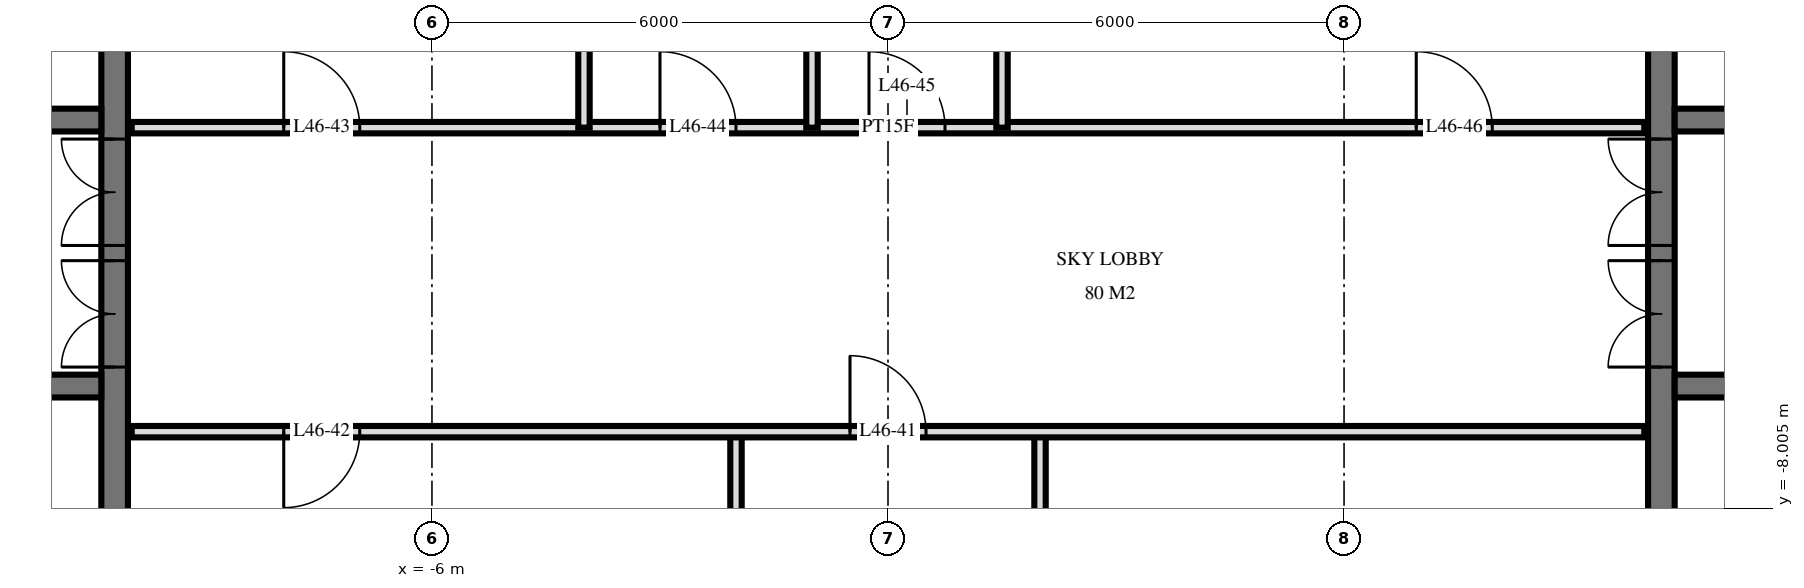
"""IFC4 building model, lengths in metres.
Left out: names, types, materials, properties, quantities, classifications, styles, units other than length and angle.
Written with IfcOpenShell. Run it as: python <this file> out.ifc"""

import sys

from ifc_helpers import new_model, si_unit, direction, frame, frame_2d, origin, place, context, subcontext, project, spatial, rectangle, extrude, element, fill, save


model = new_model("IFC4")
c1 = context("Model", 3, precision=1e-05, world=origin(), true_north=direction((0.0, 1.0)))
c2 = subcontext(c1, "Body", "Model", "MODEL_VIEW")
j1 = project(units=[si_unit("LENGTHUNIT", "METRE"), si_unit("PLANEANGLEUNIT", "RADIAN")], contexts=[c1])
p1 = place(None, origin())
s1 = spatial("IfcSite", under=j1, at=p1, CompositionType="ELEMENT")
p2 = place(p1, origin())
s2 = spatial("IfcBuilding", under=s1, at=p2, CompositionType="ELEMENT")
p3 = place(p2, frame((0.0, 0.0, 177.6)))
s3 = spatial("IfcBuildingStorey", under=s2, at=p3, CompositionType="ELEMENT", Elevation=177.6)
p4 = place(p3, frame((-10.175, -14.55, 0.0), z_axis=(0.0, 0.0, 1.0), x_axis=(0.0, 1.0, 0.0)))
e1 = element("IfcWall", 1, at=p4, inside=s3, PredefinedType="SHEAR", context=c2, shape_type="SweptSolid", body=[
    extrude(rectangle(XDim=14.1, YDim=0.35, at=frame_2d((7.05, 0.0))), origin(), (0.0, 0.0, 1.0), 6.0),
])
p5 = place(p4, frame((8.4, 0.0, 0.0)))
e2 = element("IfcOpeningElement", 2, at=p5, cuts=e1, PredefinedType="OPENING", context=c2, shape_type="SweptSolid", body=[
    extrude(rectangle(XDim=1.4, YDim=2.4, at=frame_2d((0.7, 1.2))), frame((0.0, 0.185, 0.0), z_axis=(0.0, -1.0, 0.0), x_axis=(1.0, 0.0, 0.0)), (0.0, 0.0, 1.0), 0.37),
])
p6 = place(p4, frame((10.0, 0.0, 0.0)))
e3 = element("IfcOpeningElement", 3, at=p6, cuts=e1, PredefinedType="OPENING", context=c2, shape_type="SweptSolid", body=[
    extrude(rectangle(XDim=1.4, YDim=2.4, at=frame_2d((0.7, 1.2))), frame((0.0, 0.185, 0.0), z_axis=(0.0, -1.0, 0.0), x_axis=(1.0, 0.0, 0.0)), (0.0, 0.0, 1.0), 0.37),
])
p7 = place(p4, frame((4.0, 0.0, 0.0)))
e4 = element("IfcOpeningElement", 4, at=p7, cuts=e1, PredefinedType="OPENING", context=c2, shape_type="SweptSolid", body=[
    extrude(rectangle(XDim=1.2, YDim=2.1, at=frame_2d((0.6, 1.05))), frame((0.0, 0.185, 0.0), z_axis=(0.0, -1.0, 0.0), x_axis=(1.0, 0.0, 0.0)), (0.0, 0.0, 1.0), 0.37),
])
p8 = place(p3, frame((-24.05, -2.9, 0.0), z_axis=(0.0, 0.0, 1.0), x_axis=(1.0, 0.0, 0.0)))
e5 = element("IfcWall", 5, at=p8, inside=s3, PredefinedType="SHEAR", context=c2, shape_type="SweptSolid", body=[
    extrude(rectangle(XDim=13.7, YDim=0.3, at=frame_2d((6.85, 0.0))), origin(), (0.0, 0.0, 1.0), 6.0),
])
p9 = place(p8, frame((0.55, 0.0, 0.0)))
e6 = element("IfcOpeningElement", 6, at=p9, cuts=e5, PredefinedType="OPENING", context=c2, shape_type="SweptSolid", body=[
    extrude(rectangle(XDim=1.1, YDim=2.1, at=frame_2d((0.55, 1.05))), frame((0.0, 0.16, 0.0), z_axis=(0.0, -1.0, 0.0), x_axis=(1.0, 0.0, 0.0)), (0.0, 0.0, 1.0), 0.32),
])
p10 = place(p8, frame((5.9, 0.0, 0.0)))
e7 = element("IfcOpeningElement", 7, at=p10, cuts=e5, PredefinedType="OPENING", context=c2, shape_type="SweptSolid", body=[
    extrude(rectangle(XDim=0.9, YDim=2.1, at=frame_2d((0.45, 1.05))), frame((0.0, 0.16, 0.0), z_axis=(0.0, -1.0, 0.0), x_axis=(1.0, 0.0, 0.0)), (0.0, 0.0, 1.0), 0.32),
])
p11 = place(p8, frame((11.85, 0.0, 0.0)))
e8 = element("IfcOpeningElement", 8, at=p11, cuts=e5, PredefinedType="OPENING", context=c2, shape_type="SweptSolid", body=[
    extrude(rectangle(XDim=1.0, YDim=2.1, at=frame_2d((0.5, 1.05))), frame((0.0, 0.16, 0.0), z_axis=(0.0, -1.0, 0.0), x_axis=(1.0, 0.0, 0.0)), (0.0, 0.0, 1.0), 0.32),
])
p12 = place(p8, frame((9.312, 0.0, 0.0)))
e9 = element("IfcOpeningElement", 9, at=p12, cuts=e5, PredefinedType="OPENING", context=c2, shape_type="SweptSolid", body=[
    extrude(rectangle(XDim=1.0, YDim=2.1, at=frame_2d((0.5, 1.05))), frame((0.0, 0.16, 0.0), z_axis=(0.0, -1.0, 0.0), x_axis=(1.0, 0.0, 0.0)), (0.0, 0.0, 1.0), 0.32),
])
p13 = place(p8, frame((7.887, 0.0, 0.0)))
e10 = element("IfcOpeningElement", 10, at=p13, cuts=e5, PredefinedType="OPENING", context=c2, shape_type="SweptSolid", body=[
    extrude(rectangle(XDim=1.0, YDim=2.1, at=frame_2d((0.5, 1.05))), frame((0.0, 0.16, 0.0), z_axis=(0.0, -1.0, 0.0), x_axis=(1.0, 0.0, 0.0)), (0.0, 0.0, 1.0), 0.32),
])
p14 = place(p8, frame((3.0, 0.0, 0.0)))
e11 = element("IfcOpeningElement", 11, at=p14, cuts=e5, PredefinedType="OPENING", context=c2, shape_type="SweptSolid", body=[
    extrude(rectangle(XDim=1.0, YDim=2.1, at=frame_2d((0.5, 1.05))), frame((0.0, 0.16, 0.0), z_axis=(0.0, -1.0, 0.0), x_axis=(1.0, 0.0, 0.0)), (0.0, 0.0, 1.0), 0.32),
])
p15 = place(p3, frame((-24.05, -6.4, 0.0), z_axis=(0.0, 0.0, 1.0), x_axis=(1.0, 0.0, 0.0)))
e12 = element("IfcWall", 12, at=p15, inside=s3, PredefinedType="SHEAR", context=c2, shape_type="SweptSolid", body=[
    extrude(rectangle(XDim=13.7, YDim=0.3, at=frame_2d((6.85, 0.0))), origin(), (0.0, 0.0, 1.0), 6.0),
])
p16 = place(p15, frame((2.95, 0.0, 0.0)))
e13 = element("IfcOpeningElement", 13, at=p16, cuts=e12, PredefinedType="OPENING", context=c2, shape_type="SweptSolid", body=[
    extrude(rectangle(XDim=1.1, YDim=2.1, at=frame_2d((0.55, 1.05))), frame((0.0, 0.16, 0.0), z_axis=(0.0, -1.0, 0.0), x_axis=(1.0, 0.0, 0.0)), (0.0, 0.0, 1.0), 0.32),
])
p17 = place(p15, frame((0.55, 0.0, 0.0)))
e14 = element("IfcOpeningElement", 14, at=p17, cuts=e12, PredefinedType="OPENING", context=c2, shape_type="SweptSolid", body=[
    extrude(rectangle(XDim=1.1, YDim=2.1, at=frame_2d((0.55, 1.05))), frame((0.0, 0.16, 0.0), z_axis=(0.0, -1.0, 0.0), x_axis=(1.0, 0.0, 0.0)), (0.0, 0.0, 1.0), 0.32),
])
p18 = place(p15, frame((5.8, 0.0, 0.0)))
e15 = element("IfcOpeningElement", 15, at=p18, cuts=e12, PredefinedType="OPENING", context=c2, shape_type="SweptSolid", body=[
    extrude(rectangle(XDim=1.1, YDim=2.1, at=frame_2d((0.55, 1.05))), frame((0.0, 0.16, 0.0), z_axis=(0.0, -1.0, 0.0), x_axis=(1.0, 0.0, 0.0)), (0.0, 0.0, 1.0), 0.32),
])
p19 = place(p3, frame((10.175, -14.55, 0.0), z_axis=(0.0, 0.0, 1.0), x_axis=(0.0, 1.0, 0.0)))
e16 = element("IfcWall", 16, at=p19, inside=s3, PredefinedType="SHEAR", context=c2, shape_type="SweptSolid", body=[
    extrude(rectangle(XDim=14.1, YDim=0.35, at=frame_2d((7.05, 0.0))), origin(), (0.0, 0.0, 1.0), 6.0),
])
p20 = place(p19, frame((8.4, 0.0, 0.0)))
e17 = element("IfcOpeningElement", 17, at=p20, cuts=e16, PredefinedType="OPENING", context=c2, shape_type="SweptSolid", body=[
    extrude(rectangle(XDim=1.4, YDim=2.4, at=frame_2d((0.7, 1.2))), frame((0.0, 0.185, 0.0), z_axis=(0.0, -1.0, 0.0), x_axis=(1.0, 0.0, 0.0)), (0.0, 0.0, 1.0), 0.37),
])
p21 = place(p19, frame((10.0, 0.0, 0.0)))
e18 = element("IfcOpeningElement", 18, at=p21, cuts=e16, PredefinedType="OPENING", context=c2, shape_type="SweptSolid", body=[
    extrude(rectangle(XDim=1.4, YDim=2.4, at=frame_2d((0.7, 1.2))), frame((0.0, 0.185, 0.0), z_axis=(0.0, -1.0, 0.0), x_axis=(1.0, 0.0, 0.0)), (0.0, 0.0, 1.0), 0.37),
])
p22 = place(p19, frame((4.0, 0.0, 0.0)))
e19 = element("IfcOpeningElement", 19, at=p22, cuts=e16, PredefinedType="OPENING", context=c2, shape_type="SweptSolid", body=[
    extrude(rectangle(XDim=1.2, YDim=2.1, at=frame_2d((0.6, 1.05))), frame((0.0, 0.185, 0.0), z_axis=(0.0, -1.0, 0.0), x_axis=(1.0, 0.0, 0.0)), (0.0, 0.0, 1.0), 0.37),
])
p23 = place(p3, frame((10.35, -2.9, 0.0), z_axis=(0.0, 0.0, 1.0), x_axis=(1.0, 0.0, 0.0)))
e20 = element("IfcWall", 20, at=p23, inside=s3, PredefinedType="SHEAR", context=c2, shape_type="SweptSolid", body=[
    extrude(rectangle(XDim=13.7, YDim=0.3, at=frame_2d((6.85, 0.0))), origin(), (0.0, 0.0, 1.0), 6.0),
])
p24 = place(p23, frame((12.05, 0.0, 0.0)))
e21 = element("IfcOpeningElement", 21, at=p24, cuts=e20, PredefinedType="OPENING", context=c2, shape_type="SweptSolid", body=[
    extrude(rectangle(XDim=1.1, YDim=2.1, at=frame_2d((0.55, 1.05))), frame((0.0, 0.16, 0.0), z_axis=(0.0, -1.0, 0.0), x_axis=(1.0, 0.0, 0.0)), (0.0, 0.0, 1.0), 0.32),
])
p25 = place(p23, frame((6.9, 0.0, 0.0)))
e22 = element("IfcOpeningElement", 22, at=p25, cuts=e20, PredefinedType="OPENING", context=c2, shape_type="SweptSolid", body=[
    extrude(rectangle(XDim=0.9, YDim=2.1, at=frame_2d((0.45, 1.05))), frame((0.0, 0.16, 0.0), z_axis=(0.0, -1.0, 0.0), x_axis=(1.0, 0.0, 0.0)), (0.0, 0.0, 1.0), 0.32),
])
p26 = place(p23, frame((0.85, 0.0, 0.0)))
e23 = element("IfcOpeningElement", 23, at=p26, cuts=e20, PredefinedType="OPENING", context=c2, shape_type="SweptSolid", body=[
    extrude(rectangle(XDim=1.0, YDim=2.1, at=frame_2d((0.5, 1.05))), frame((0.0, 0.16, 0.0), z_axis=(0.0, -1.0, 0.0), x_axis=(1.0, 0.0, 0.0)), (0.0, 0.0, 1.0), 0.32),
])
p27 = place(p23, frame((3.387, 0.0, 0.0)))
e24 = element("IfcOpeningElement", 24, at=p27, cuts=e20, PredefinedType="OPENING", context=c2, shape_type="SweptSolid", body=[
    extrude(rectangle(XDim=1.0, YDim=2.1, at=frame_2d((0.5, 1.05))), frame((0.0, 0.16, 0.0), z_axis=(0.0, -1.0, 0.0), x_axis=(1.0, 0.0, 0.0)), (0.0, 0.0, 1.0), 0.32),
])
p28 = place(p23, frame((4.812, 0.0, 0.0)))
e25 = element("IfcOpeningElement", 25, at=p28, cuts=e20, PredefinedType="OPENING", context=c2, shape_type="SweptSolid", body=[
    extrude(rectangle(XDim=1.0, YDim=2.1, at=frame_2d((0.5, 1.05))), frame((0.0, 0.16, 0.0), z_axis=(0.0, -1.0, 0.0), x_axis=(1.0, 0.0, 0.0)), (0.0, 0.0, 1.0), 0.32),
])
p29 = place(p23, frame((9.7, 0.0, 0.0)))
e26 = element("IfcOpeningElement", 26, at=p29, cuts=e20, PredefinedType="OPENING", context=c2, shape_type="SweptSolid", body=[
    extrude(rectangle(XDim=1.0, YDim=2.1, at=frame_2d((0.5, 1.05))), frame((0.0, 0.16, 0.0), z_axis=(0.0, -1.0, 0.0), x_axis=(1.0, 0.0, 0.0)), (0.0, 0.0, 1.0), 0.32),
])
p30 = place(p3, frame((10.35, -6.4, 0.0), z_axis=(0.0, 0.0, 1.0), x_axis=(1.0, 0.0, 0.0)))
e27 = element("IfcWall", 27, at=p30, inside=s3, PredefinedType="SHEAR", context=c2, shape_type="SweptSolid", body=[
    extrude(rectangle(XDim=13.7, YDim=0.3, at=frame_2d((6.85, 0.0))), origin(), (0.0, 0.0, 1.0), 6.0),
])
p31 = place(p30, frame((9.65, 0.0, 0.0)))
e28 = element("IfcOpeningElement", 28, at=p31, cuts=e27, PredefinedType="OPENING", context=c2, shape_type="SweptSolid", body=[
    extrude(rectangle(XDim=1.1, YDim=2.1, at=frame_2d((0.55, 1.05))), frame((0.0, 0.16, 0.0), z_axis=(0.0, -1.0, 0.0), x_axis=(1.0, 0.0, 0.0)), (0.0, 0.0, 1.0), 0.32),
])
p32 = place(p30, frame((12.05, 0.0, 0.0)))
e29 = element("IfcOpeningElement", 29, at=p32, cuts=e27, PredefinedType="OPENING", context=c2, shape_type="SweptSolid", body=[
    extrude(rectangle(XDim=1.1, YDim=2.1, at=frame_2d((0.55, 1.05))), frame((0.0, 0.16, 0.0), z_axis=(0.0, -1.0, 0.0), x_axis=(1.0, 0.0, 0.0)), (0.0, 0.0, 1.0), 0.32),
])
p33 = place(p30, frame((6.8, 0.0, 0.0)))
e30 = element("IfcOpeningElement", 30, at=p33, cuts=e27, PredefinedType="OPENING", context=c2, shape_type="SweptSolid", body=[
    extrude(rectangle(XDim=1.1, YDim=2.1, at=frame_2d((0.55, 1.05))), frame((0.0, 0.16, 0.0), z_axis=(0.0, -1.0, 0.0), x_axis=(1.0, 0.0, 0.0)), (0.0, 0.0, 1.0), 0.32),
])
p34 = place(p3, frame((2.0, -11.0, 0.0), z_axis=(0.0, 0.0, 1.0), x_axis=(0.0, 1.0, 0.0)))
e31 = element("IfcWall", 31, at=p34, inside=s3, PredefinedType="PARTITIONING", context=c2, shape_type="SweptSolid", body=[
    extrude(rectangle(XDim=4.0, YDim=0.15, at=frame_2d((2.0, 0.0))), origin(), (0.0, 0.0, 1.0), 5.7),
])
for number, where, z_axis, x_axis in (
    (32, (1.5, -3.0, 0.0), (0.0, 0.0, 1.0), (0.0, 1.0, 0.0)),
    (33, (-1.0, -3.0, 0.0), (0.0, 0.0, 1.0), (0.0, 1.0, 0.0)),
):
    element("IfcWall", number, at=place(p3, frame(where, z_axis=z_axis, x_axis=x_axis)), inside=s3, PredefinedType="PLUMBINGWALL", context=c2, shape_type="SweptSolid", body=[
        extrude(rectangle(XDim=3.96, YDim=0.15, at=frame_2d((1.98, 0.0))), origin(), (0.0, 0.0, 1.0), 5.7),
    ])
p35 = place(p3, frame((-2.0, -11.0, 0.0), z_axis=(0.0, 0.0, 1.0), x_axis=(0.0, 1.0, 0.0)))
e34 = element("IfcWall", 34, at=p35, inside=s3, PredefinedType="PARTITIONING", context=c2, shape_type="SweptSolid", body=[
    extrude(rectangle(XDim=4.0, YDim=0.15, at=frame_2d((2.0, 0.0))), origin(), (0.0, 0.0, 1.0), 5.7),
])
p36 = place(p3, frame((-4.0, -3.0, 0.0), z_axis=(0.0, 0.0, 1.0), x_axis=(0.0, 1.0, 0.0)))
e35 = element("IfcWall", 35, at=p36, inside=s3, PredefinedType="PLUMBINGWALL", context=c2, shape_type="SweptSolid", body=[
    extrude(rectangle(XDim=3.96, YDim=0.15, at=frame_2d((1.98, 0.0))), origin(), (0.0, 0.0, 1.0), 5.7),
])
p37 = place(p3, frame((-9.95, -7.0, 0.0), z_axis=(0.0, 0.0, 1.0), x_axis=(1.0, 0.0, 0.0)))
e36 = element("IfcWall", 36, at=p37, inside=s3, PredefinedType="PARTITIONING", context=c2, shape_type="SweptSolid", body=[
    extrude(rectangle(XDim=19.9, YDim=0.15, at=frame_2d((9.95, 0.0))), origin(), (0.0, 0.0, 1.0), 5.7),
])
p38 = place(p37, frame((9.45, 0.0, 0.0)))
e37 = element("IfcOpeningElement", 37, at=p38, cuts=e36, PredefinedType="OPENING", context=c2, shape_type="SweptSolid", body=[
    extrude(rectangle(XDim=1.0, YDim=2.1, at=frame_2d((0.5, 1.05))), frame((0.0, 0.085, 0.0), z_axis=(0.0, -1.0, 0.0), x_axis=(1.0, 0.0, 0.0)), (0.0, 0.0, 1.0), 0.17),
])
p39 = place(p37, frame((2.0, 0.0, 0.0)))
e38 = element("IfcOpeningElement", 38, at=p39, cuts=e36, PredefinedType="OPENING", context=c2, shape_type="SweptSolid", body=[
    extrude(rectangle(XDim=1.0, YDim=2.1, at=frame_2d((0.5, 1.05))), frame((0.0, 0.085, 0.0), z_axis=(0.0, -1.0, 0.0), x_axis=(1.0, 0.0, 0.0)), (0.0, 0.0, 1.0), 0.17),
])
p40 = place(p3, frame((-9.95, -3.0, 0.0), z_axis=(0.0, 0.0, 1.0), x_axis=(1.0, 0.0, 0.0)))
e39 = element("IfcWall", 39, at=p40, inside=s3, PredefinedType="PARTITIONING", context=c2, shape_type="SweptSolid", body=[
    extrude(rectangle(XDim=19.9, YDim=0.15, at=frame_2d((9.95, 0.0))), origin(), (0.0, 0.0, 1.0), 5.7),
])
p41 = place(p40, frame((2.0, 0.0, 0.0)))
e40 = element("IfcOpeningElement", 40, at=p41, cuts=e39, PredefinedType="OPENING", context=c2, shape_type="SweptSolid", body=[
    extrude(rectangle(XDim=1.0, YDim=2.1, at=frame_2d((0.5, 1.05))), frame((0.0, 0.085, 0.0), z_axis=(0.0, -1.0, 0.0), x_axis=(1.0, 0.0, 0.0)), (0.0, 0.0, 1.0), 0.17),
])
p42 = place(p40, frame((6.95, 0.0, 0.0)))
e41 = element("IfcOpeningElement", 41, at=p42, cuts=e39, PredefinedType="OPENING", context=c2, shape_type="SweptSolid", body=[
    extrude(rectangle(XDim=1.0, YDim=2.1, at=frame_2d((0.5, 1.05))), frame((0.0, 0.085, 0.0), z_axis=(0.0, -1.0, 0.0), x_axis=(1.0, 0.0, 0.0)), (0.0, 0.0, 1.0), 0.17),
])
p43 = place(p40, frame((9.7, 0.0, 0.0)))
e42 = element("IfcOpeningElement", 42, at=p43, cuts=e39, PredefinedType="OPENING", context=c2, shape_type="SweptSolid", body=[
    extrude(rectangle(XDim=1.0, YDim=2.1, at=frame_2d((0.5, 1.05))), frame((0.0, 0.085, 0.0), z_axis=(0.0, -1.0, 0.0), x_axis=(1.0, 0.0, 0.0)), (0.0, 0.0, 1.0), 0.17),
])
p44 = place(p40, frame((16.9, 0.0, 0.0)))
e43 = element("IfcOpeningElement", 43, at=p44, cuts=e39, PredefinedType="OPENING", context=c2, shape_type="SweptSolid", body=[
    extrude(rectangle(XDim=1.0, YDim=2.1, at=frame_2d((0.5, 1.05))), frame((0.0, 0.085, 0.0), z_axis=(0.0, -1.0, 0.0), x_axis=(1.0, 0.0, 0.0)), (0.0, 0.0, 1.0), 0.17),
])
p45 = place(p5, origin())
e44 = element("IfcDoor", 44, at=p45, inside=s3, OperationType="DOUBLE_DOOR_SINGLE_SWING", PredefinedType="DOOR", context=c2, shape_type="SweptSolid", body=[
    extrude(rectangle(XDim=1.4, YDim=2.4, at=frame_2d((0.7, 1.2))), frame((0.0, 0.025, 0.0), z_axis=(0.0, -1.0, 0.0), x_axis=(1.0, 0.0, 0.0)), (0.0, 0.0, 1.0), 0.05),
])
fill(e2, e44)
p46 = place(p6, origin())
e45 = element("IfcDoor", 45, at=p46, inside=s3, OperationType="DOUBLE_DOOR_SINGLE_SWING", PredefinedType="DOOR", context=c2, shape_type="SweptSolid", body=[
    extrude(rectangle(XDim=1.4, YDim=2.4, at=frame_2d((0.7, 1.2))), frame((0.0, 0.025, 0.0), z_axis=(0.0, -1.0, 0.0), x_axis=(1.0, 0.0, 0.0)), (0.0, 0.0, 1.0), 0.05),
])
fill(e3, e45)
p47 = place(p20, origin())
e46 = element("IfcDoor", 46, at=p47, inside=s3, OperationType="DOUBLE_DOOR_SINGLE_SWING", PredefinedType="DOOR", context=c2, shape_type="SweptSolid", body=[
    extrude(rectangle(XDim=1.4, YDim=2.4, at=frame_2d((0.7, 1.2))), frame((0.0, 0.025, 0.0), z_axis=(0.0, -1.0, 0.0), x_axis=(1.0, 0.0, 0.0)), (0.0, 0.0, 1.0), 0.05),
])
fill(e17, e46)
p48 = place(p21, origin())
e47 = element("IfcDoor", 47, at=p48, inside=s3, OperationType="DOUBLE_DOOR_SINGLE_SWING", PredefinedType="DOOR", context=c2, shape_type="SweptSolid", body=[
    extrude(rectangle(XDim=1.4, YDim=2.4, at=frame_2d((0.7, 1.2))), frame((0.0, 0.025, 0.0), z_axis=(0.0, -1.0, 0.0), x_axis=(1.0, 0.0, 0.0)), (0.0, 0.0, 1.0), 0.05),
])
fill(e18, e47)
p49 = place(p38, origin())
e48 = element("IfcDoor", 48, at=p49, inside=s3, OperationType="SINGLE_SWING_RIGHT", PredefinedType="DOOR", context=c2, shape_type="SweptSolid", body=[
    extrude(rectangle(XDim=1.0, YDim=2.1, at=frame_2d((0.5, 1.05))), frame((0.0, 0.025, 0.0), z_axis=(0.0, -1.0, 0.0), x_axis=(1.0, 0.0, 0.0)), (0.0, 0.0, 1.0), 0.05),
])
fill(e37, e48)
p50 = place(p39, frame((0.5, 0.0, 0.0), z_axis=(0.0, 0.0, 1.0), x_axis=(-1.0, 0.0, 0.0)))
e49 = element("IfcDoor", 49, at=p50, inside=s3, OperationType="SINGLE_SWING_LEFT", PredefinedType="DOOR", context=c2, shape_type="SweptSolid", body=[
    extrude(rectangle(XDim=1.0, YDim=2.1, at=frame_2d((0.0, 1.05))), frame((0.0, -0.025, 0.0), z_axis=(0.0, 1.0, 0.0), x_axis=(-1.0, 0.0, 0.0)), (0.0, 0.0, 1.0), 0.05),
])
fill(e38, e49)
p51 = place(p41, origin())
e50 = element("IfcDoor", 50, at=p51, inside=s3, OperationType="SINGLE_SWING_RIGHT", PredefinedType="DOOR", context=c2, shape_type="SweptSolid", body=[
    extrude(rectangle(XDim=1.0, YDim=2.1, at=frame_2d((0.5, 1.05))), frame((0.0, 0.025, 0.0), z_axis=(0.0, -1.0, 0.0), x_axis=(1.0, 0.0, 0.0)), (0.0, 0.0, 1.0), 0.05),
])
fill(e40, e50)
p52 = place(p42, origin())
e51 = element("IfcDoor", 51, at=p52, inside=s3, OperationType="SINGLE_SWING_RIGHT", PredefinedType="DOOR", context=c2, shape_type="SweptSolid", body=[
    extrude(rectangle(XDim=1.0, YDim=2.1, at=frame_2d((0.5, 1.05))), frame((0.0, 0.025, 0.0), z_axis=(0.0, -1.0, 0.0), x_axis=(1.0, 0.0, 0.0)), (0.0, 0.0, 1.0), 0.05),
])
fill(e41, e51)
p53 = place(p43, origin())
e52 = element("IfcDoor", 52, at=p53, inside=s3, OperationType="SINGLE_SWING_RIGHT", PredefinedType="DOOR", context=c2, shape_type="SweptSolid", body=[
    extrude(rectangle(XDim=1.0, YDim=2.1, at=frame_2d((0.5, 1.05))), frame((0.0, 0.025, 0.0), z_axis=(0.0, -1.0, 0.0), x_axis=(1.0, 0.0, 0.0)), (0.0, 0.0, 1.0), 0.05),
])
fill(e42, e52)
p54 = place(p44, origin())
e53 = element("IfcDoor", 53, at=p54, inside=s3, OperationType="SINGLE_SWING_RIGHT", PredefinedType="DOOR", context=c2, shape_type="SweptSolid", body=[
    extrude(rectangle(XDim=1.0, YDim=2.1, at=frame_2d((0.5, 1.05))), frame((0.0, 0.025, 0.0), z_axis=(0.0, -1.0, 0.0), x_axis=(1.0, 0.0, 0.0)), (0.0, 0.0, 1.0), 0.05),
])
fill(e43, e53)
save(model, sys.argv[1])
